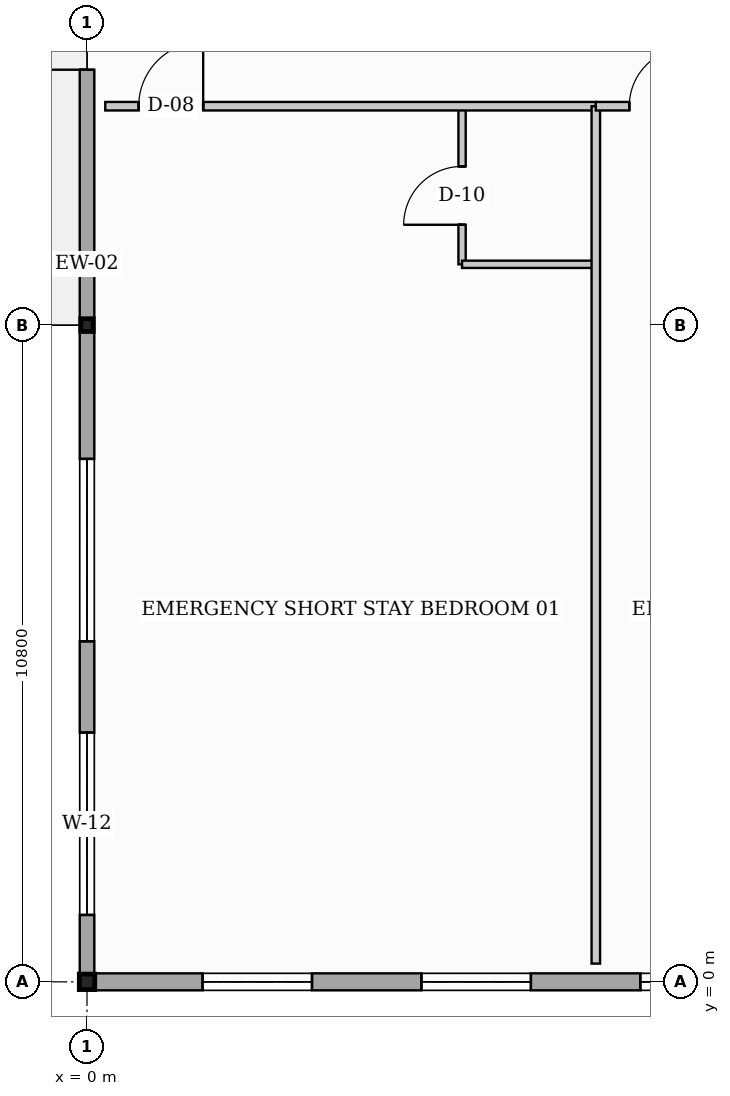
"""IFC4 building model, lengths in metres.
Left out: names, types, materials, properties, quantities, classifications, styles, units other than length and angle.
Written with IfcOpenShell. Run it as: python <this file> out.ifc"""

import sys

from ifc_helpers import new_model, si_unit, direction, frame, frame_2d, origin, origin_with_axes, origin_2d, place, context, subcontext, project, spatial, rectangle, i_section, extrude, element, fill, save


model = new_model("IFC4")
c1 = context("Model", 3, precision=1e-05, world=origin(), true_north=direction((0.0, 1.0)))
c2 = subcontext(c1, "Body", "Model", "MODEL_VIEW")
j1 = project(units=[si_unit("LENGTHUNIT", "METRE"), si_unit("PLANEANGLEUNIT", "RADIAN")], contexts=[c1])
p1 = place(None, origin())
s1 = spatial("IfcSite", under=j1, at=p1, CompositionType="ELEMENT")
p2 = place(p1, origin())
s2 = spatial("IfcBuilding", under=s1, at=p2, CompositionType="ELEMENT")
p3 = place(p2, origin())
s3 = spatial("IfcBuildingStorey", under=s2, at=p3, CompositionType="ELEMENT", Elevation=0.0)
p4 = place(p3, origin_with_axes())
e1 = element("IfcColumn", 1, at=p4, inside=s3, PredefinedType="COLUMN", context=c2, shape_type="SweptSolid", body=[
    extrude(i_section(OverallWidth=0.254, OverallDepth=0.254, WebThickness=0.009, FlangeThickness=0.014, at=origin_2d()), origin(), (0.0, 0.0, 1.0), 4.8),
])
p5 = place(p3, frame((0.0, 10.8, 0.0), z_axis=(0.0, 0.0, 1.0), x_axis=(1.0, 0.0, 0.0)))
e2 = element("IfcColumn", 2, at=p5, inside=s3, PredefinedType="COLUMN", context=c2, shape_type="SweptSolid", body=[
    extrude(i_section(OverallWidth=0.205, OverallDepth=0.21, WebThickness=0.009, FlangeThickness=0.014, at=origin_2d()), origin(), (0.0, 0.0, 1.0), 4.8),
])
p6 = place(p3, frame((0.0, 0.0, 0.0), z_axis=(0.0, 0.0, 1.0), x_axis=(0.0, 1.0, 0.0)))
e3 = element("IfcWall", 3, at=p6, inside=s3, PredefinedType="STANDARD", context=c2, shape_type="SweptSolid", body=[
    extrude(rectangle(XDim=45.6, YDim=0.24, at=frame_2d((22.8, 0.0))), origin(), (0.0, 0.0, 1.0), 3.738),
])
p7 = place(p6, frame((15.0, 0.0, 0.0)))
e4 = element("IfcOpeningElement", 4, at=p7, cuts=e3, PredefinedType="OPENING", context=c2, shape_type="SweptSolid", body=[
    extrude(rectangle(XDim=2.3, YDim=2.3, at=frame_2d((1.15, 1.15))), frame((0.0, 0.13, 0.0), z_axis=(0.0, -1.0, 0.0), x_axis=(1.0, 0.0, 0.0)), (0.0, 0.0, 1.0), 0.26),
])
p8 = place(p6, frame((1.1, 0.0, 0.95)))
e5 = element("IfcOpeningElement", 5, at=p8, cuts=e3, PredefinedType="OPENING", context=c2, shape_type="SweptSolid", body=[
    extrude(rectangle(XDim=3.0, YDim=1.8, at=frame_2d((1.5, 0.9))), frame((0.0, 0.13, 0.0), z_axis=(0.0, -1.0, 0.0), x_axis=(1.0, 0.0, 0.0)), (0.0, 0.0, 1.0), 0.26),
])
p9 = place(p6, frame((5.6, 0.0, 0.95)))
e6 = element("IfcOpeningElement", 6, at=p9, cuts=e3, PredefinedType="OPENING", context=c2, shape_type="SweptSolid", body=[
    extrude(rectangle(XDim=3.0, YDim=1.8, at=frame_2d((1.5, 0.9))), frame((0.0, 0.13, 0.0), z_axis=(0.0, -1.0, 0.0), x_axis=(1.0, 0.0, 0.0)), (0.0, 0.0, 1.0), 0.26),
])
p10 = place(p6, frame((23.6, 0.0, 0.95)))
e7 = element("IfcOpeningElement", 7, at=p10, cuts=e3, PredefinedType="OPENING", context=c2, shape_type="SweptSolid", body=[
    extrude(rectangle(XDim=3.0, YDim=1.8, at=frame_2d((1.5, 0.9))), frame((0.0, 0.13, 0.0), z_axis=(0.0, -1.0, 0.0), x_axis=(1.0, 0.0, 0.0)), (0.0, 0.0, 1.0), 0.26),
])
p11 = place(p6, frame((28.1, 0.0, 0.95)))
e8 = element("IfcOpeningElement", 8, at=p11, cuts=e3, PredefinedType="OPENING", context=c2, shape_type="SweptSolid", body=[
    extrude(rectangle(XDim=3.0, YDim=1.8, at=frame_2d((1.5, 0.9))), frame((0.0, 0.13, 0.0), z_axis=(0.0, -1.0, 0.0), x_axis=(1.0, 0.0, 0.0)), (0.0, 0.0, 1.0), 0.26),
])
p12 = place(p6, frame((37.1, 0.0, 0.95)))
e9 = element("IfcOpeningElement", 9, at=p12, cuts=e3, PredefinedType="OPENING", context=c2, shape_type="SweptSolid", body=[
    extrude(rectangle(XDim=3.0, YDim=1.8, at=frame_2d((1.5, 0.9))), frame((0.0, 0.13, 0.0), z_axis=(0.0, -1.0, 0.0), x_axis=(1.0, 0.0, 0.0)), (0.0, 0.0, 1.0), 0.26),
])
p13 = place(p6, frame((41.6, 0.0, 0.95)))
e10 = element("IfcOpeningElement", 10, at=p13, cuts=e3, PredefinedType="OPENING", context=c2, shape_type="SweptSolid", body=[
    extrude(rectangle(XDim=3.0, YDim=1.8, at=frame_2d((1.5, 0.9))), frame((0.0, 0.13, 0.0), z_axis=(0.0, -1.0, 0.0), x_axis=(1.0, 0.0, 0.0)), (0.0, 0.0, 1.0), 0.26),
])
p14 = place(p3, frame((48.0, 0.0, 0.0), z_axis=(0.0, 0.0, 1.0), x_axis=(-1.0, 0.0, 0.0)))
e11 = element("IfcWall", 11, at=p14, inside=s3, PredefinedType="STANDARD", context=c2, shape_type="SweptSolid", body=[
    extrude(rectangle(XDim=48.0, YDim=0.28, at=frame_2d((24.0, 0.0))), origin(), (0.0, 0.0, 1.0), 3.828),
])
p15 = place(p14, frame((1.1, 0.0, 0.95)))
e12 = element("IfcOpeningElement", 12, at=p15, cuts=e11, PredefinedType="OPENING", context=c2, shape_type="SweptSolid", body=[
    extrude(rectangle(XDim=1.8, YDim=0.9, at=frame_2d((0.9, 0.45))), frame((0.0, 0.15, 0.0), z_axis=(0.0, -1.0, 0.0), x_axis=(1.0, 0.0, 0.0)), (0.0, 0.0, 1.0), 0.3),
])
p16 = place(p14, frame((4.7, 0.0, 0.95)))
e13 = element("IfcOpeningElement", 13, at=p16, cuts=e11, PredefinedType="OPENING", context=c2, shape_type="SweptSolid", body=[
    extrude(rectangle(XDim=1.8, YDim=0.9, at=frame_2d((0.9, 0.45))), frame((0.0, 0.15, 0.0), z_axis=(0.0, -1.0, 0.0), x_axis=(1.0, 0.0, 0.0)), (0.0, 0.0, 1.0), 0.3),
])
p17 = place(p14, frame((8.3, 0.0, 0.95)))
e14 = element("IfcOpeningElement", 14, at=p17, cuts=e11, PredefinedType="OPENING", context=c2, shape_type="SweptSolid", body=[
    extrude(rectangle(XDim=1.8, YDim=0.9, at=frame_2d((0.9, 0.45))), frame((0.0, 0.15, 0.0), z_axis=(0.0, -1.0, 0.0), x_axis=(1.0, 0.0, 0.0)), (0.0, 0.0, 1.0), 0.3),
])
p18 = place(p14, frame((15.5, 0.0, 0.95)))
e15 = element("IfcOpeningElement", 15, at=p18, cuts=e11, PredefinedType="OPENING", context=c2, shape_type="SweptSolid", body=[
    extrude(rectangle(XDim=1.8, YDim=0.9, at=frame_2d((0.9, 0.45))), frame((0.0, 0.15, 0.0), z_axis=(0.0, -1.0, 0.0), x_axis=(1.0, 0.0, 0.0)), (0.0, 0.0, 1.0), 0.3),
])
p19 = place(p14, frame((19.1, 0.0, 0.95)))
e16 = element("IfcOpeningElement", 16, at=p19, cuts=e11, PredefinedType="OPENING", context=c2, shape_type="SweptSolid", body=[
    extrude(rectangle(XDim=1.8, YDim=0.9, at=frame_2d((0.9, 0.45))), frame((0.0, 0.15, 0.0), z_axis=(0.0, -1.0, 0.0), x_axis=(1.0, 0.0, 0.0)), (0.0, 0.0, 1.0), 0.3),
])
p20 = place(p14, frame((26.3, 0.0, 0.95)))
e17 = element("IfcOpeningElement", 17, at=p20, cuts=e11, PredefinedType="OPENING", context=c2, shape_type="SweptSolid", body=[
    extrude(rectangle(XDim=1.8, YDim=0.9, at=frame_2d((0.9, 0.45))), frame((0.0, 0.15, 0.0), z_axis=(0.0, -1.0, 0.0), x_axis=(1.0, 0.0, 0.0)), (0.0, 0.0, 1.0), 0.3),
])
p21 = place(p14, frame((29.9, 0.0, 0.95)))
e18 = element("IfcOpeningElement", 18, at=p21, cuts=e11, PredefinedType="OPENING", context=c2, shape_type="SweptSolid", body=[
    extrude(rectangle(XDim=1.8, YDim=0.9, at=frame_2d((0.9, 0.45))), frame((0.0, 0.15, 0.0), z_axis=(0.0, -1.0, 0.0), x_axis=(1.0, 0.0, 0.0)), (0.0, 0.0, 1.0), 0.3),
])
p22 = place(p14, frame((37.1, 0.0, 0.95)))
e19 = element("IfcOpeningElement", 19, at=p22, cuts=e11, PredefinedType="OPENING", context=c2, shape_type="SweptSolid", body=[
    extrude(rectangle(XDim=1.8, YDim=0.9, at=frame_2d((0.9, 0.45))), frame((0.0, 0.15, 0.0), z_axis=(0.0, -1.0, 0.0), x_axis=(1.0, 0.0, 0.0)), (0.0, 0.0, 1.0), 0.3),
])
p23 = place(p14, frame((40.7, 0.0, 0.95)))
e20 = element("IfcOpeningElement", 20, at=p23, cuts=e11, PredefinedType="OPENING", context=c2, shape_type="SweptSolid", body=[
    extrude(rectangle(XDim=1.8, YDim=0.9, at=frame_2d((0.9, 0.45))), frame((0.0, 0.15, 0.0), z_axis=(0.0, -1.0, 0.0), x_axis=(1.0, 0.0, 0.0)), (0.0, 0.0, 1.0), 0.3),
])
p24 = place(p14, frame((44.3, 0.0, 0.95)))
e21 = element("IfcOpeningElement", 21, at=p24, cuts=e11, PredefinedType="OPENING", context=c2, shape_type="SweptSolid", body=[
    extrude(rectangle(XDim=1.8, YDim=0.9, at=frame_2d((0.9, 0.45))), frame((0.0, 0.15, 0.0), z_axis=(0.0, -1.0, 0.0), x_axis=(1.0, 0.0, 0.0)), (0.0, 0.0, 1.0), 0.3),
])
p25 = place(p3, frame((6.168, 11.8, 0.0), z_axis=(0.0, 0.0, 1.0), x_axis=(0.0, 1.0, 0.0)))
e22 = element("IfcWall", 22, at=p25, inside=s3, PredefinedType="PARTITIONING", context=c2, shape_type="SweptSolid", body=[
    extrude(rectangle(XDim=2.6, YDim=0.12, at=frame_2d((1.3, 0.0))), origin(), (0.0, 0.0, 1.0), 4.071),
])
p26 = place(p25, frame((0.65, 0.0, 0.0)))
e23 = element("IfcOpeningElement", 23, at=p26, cuts=e22, PredefinedType="OPENING", context=c2, shape_type="SweptSolid", body=[
    extrude(rectangle(XDim=0.96, YDim=2.06, at=frame_2d((0.48, 1.03))), frame((0.0, 0.07, 0.0), z_axis=(0.0, -1.0, 0.0), x_axis=(1.0, 0.0, 0.0)), (0.0, 0.0, 1.0), 0.14),
])
p27 = place(p3, frame((6.168, 11.8, 0.0), z_axis=(0.0, 0.0, 1.0), x_axis=(1.0, 0.0, 0.0)))
e24 = element("IfcWall", 24, at=p27, inside=s3, PredefinedType="PARTITIONING", context=c2, shape_type="SweptSolid", body=[
    extrude(rectangle(XDim=2.2, YDim=0.12, at=frame_2d((1.1, 0.0))), origin(), (0.0, 0.0, 1.0), 4.445),
])
p28 = place(p3, frame((0.3, 14.4, 0.0), z_axis=(0.0, 0.0, 1.0), x_axis=(1.0, 0.0, 0.0)))
e25 = element("IfcWall", 25, at=p28, inside=s3, PredefinedType="PARTITIONING", context=c2, shape_type="SweptSolid", body=[
    extrude(rectangle(XDim=8.068, YDim=0.14, at=frame_2d((4.034, 0.0))), origin(), (0.0, 0.0, 1.0), 4.027),
])
p29 = place(p28, frame((0.55, 0.0, 0.0)))
e26 = element("IfcOpeningElement", 26, at=p29, cuts=e25, PredefinedType="OPENING", context=c2, shape_type="SweptSolid", body=[
    extrude(rectangle(XDim=1.06, YDim=2.1, at=frame_2d((0.53, 1.05))), frame((0.0, 0.08, 0.0), z_axis=(0.0, -1.0, 0.0), x_axis=(1.0, 0.0, 0.0)), (0.0, 0.0, 1.0), 0.16),
])
p30 = place(p3, frame((8.368, 0.3, 0.0), z_axis=(0.0, 0.0, 1.0), x_axis=(0.0, 1.0, 0.0)))
e27 = element("IfcWall", 27, at=p30, inside=s3, PredefinedType="PARTITIONING", context=c2, shape_type="SweptSolid", body=[
    extrude(rectangle(XDim=14.1, YDim=0.14, at=frame_2d((7.05, 0.0))), origin(), (0.0, 0.0, 1.0), 3.738),
])
p31 = place(p3, frame((8.368, 14.4, 0.0), z_axis=(0.0, 0.0, 1.0), x_axis=(1.0, 0.0, 0.0)))
e28 = element("IfcWall", 28, at=p31, inside=s3, PredefinedType="PARTITIONING", context=c2, shape_type="SweptSolid", body=[
    extrude(rectangle(XDim=8.068, YDim=0.14, at=frame_2d((4.034, 0.0))), origin(), (0.0, 0.0, 1.0), 3.897),
])
p32 = place(p31, frame((0.55, 0.0, 0.0)))
e29 = element("IfcOpeningElement", 29, at=p32, cuts=e28, PredefinedType="OPENING", context=c2, shape_type="SweptSolid", body=[
    extrude(rectangle(XDim=0.96, YDim=2.06, at=frame_2d((0.48, 1.03))), frame((0.0, 0.08, 0.0), z_axis=(0.0, -1.0, 0.0), x_axis=(1.0, 0.0, 0.0)), (0.0, 0.0, 1.0), 0.16),
])
p33 = place(p7, origin())
e30 = element("IfcDoor", 30, at=p33, inside=s3, OperationType="DOUBLE_DOOR_SINGLE_SWING", PredefinedType="DOOR", context=c2, shape_type="SweptSolid", body=[
    extrude(rectangle(XDim=2.3, YDim=2.3, at=frame_2d((1.15, 1.15))), frame((0.0, 0.025, 0.0), z_axis=(0.0, -1.0, 0.0), x_axis=(1.0, 0.0, 0.0)), (0.0, 0.0, 1.0), 0.05),
])
fill(e4, e30)
p34 = place(p8, origin())
e31 = element("IfcWindow", 31, at=p34, inside=s3, PartitioningType="TRIPLE_PANEL_VERTICAL", PredefinedType="WINDOW", context=c2, shape_type="SweptSolid", body=[
    extrude(rectangle(XDim=3.0, YDim=1.8, at=frame_2d((1.5, 0.9))), frame((0.0, 0.03, 0.0), z_axis=(0.0, -1.0, 0.0), x_axis=(1.0, 0.0, 0.0)), (0.0, 0.0, 1.0), 0.06),
])
fill(e5, e31)
p35 = place(p9, origin())
e32 = element("IfcWindow", 32, at=p35, inside=s3, PartitioningType="TRIPLE_PANEL_VERTICAL", PredefinedType="WINDOW", context=c2, shape_type="SweptSolid", body=[
    extrude(rectangle(XDim=3.0, YDim=1.8, at=frame_2d((1.5, 0.9))), frame((0.0, 0.03, 0.0), z_axis=(0.0, -1.0, 0.0), x_axis=(1.0, 0.0, 0.0)), (0.0, 0.0, 1.0), 0.06),
])
fill(e6, e32)
p36 = place(p22, origin())
e33 = element("IfcWindow", 33, at=p36, inside=s3, PartitioningType="DOUBLE_PANEL_HORIZONTAL", PredefinedType="WINDOW", context=c2, shape_type="SweptSolid", body=[
    extrude(rectangle(XDim=1.8, YDim=0.9, at=frame_2d((0.9, 0.45))), frame((0.0, 0.03, 0.0), z_axis=(0.0, -1.0, 0.0), x_axis=(1.0, 0.0, 0.0)), (0.0, 0.0, 1.0), 0.06),
])
fill(e19, e33)
p37 = place(p23, origin())
e34 = element("IfcWindow", 34, at=p37, inside=s3, PartitioningType="DOUBLE_PANEL_HORIZONTAL", PredefinedType="WINDOW", context=c2, shape_type="SweptSolid", body=[
    extrude(rectangle(XDim=1.8, YDim=0.9, at=frame_2d((0.9, 0.45))), frame((0.0, 0.03, 0.0), z_axis=(0.0, -1.0, 0.0), x_axis=(1.0, 0.0, 0.0)), (0.0, 0.0, 1.0), 0.06),
])
fill(e20, e34)
p38 = place(p24, origin())
e35 = element("IfcWindow", 35, at=p38, inside=s3, PartitioningType="DOUBLE_PANEL_HORIZONTAL", PredefinedType="WINDOW", context=c2, shape_type="SweptSolid", body=[
    extrude(rectangle(XDim=1.8, YDim=0.9, at=frame_2d((0.9, 0.45))), frame((0.0, 0.03, 0.0), z_axis=(0.0, -1.0, 0.0), x_axis=(1.0, 0.0, 0.0)), (0.0, 0.0, 1.0), 0.06),
])
fill(e21, e35)
p39 = place(p26, origin())
e36 = element("IfcDoor", 36, at=p39, inside=s3, OperationType="SINGLE_SWING_LEFT", PredefinedType="DOOR", context=c2, shape_type="SweptSolid", body=[
    extrude(rectangle(XDim=0.96, YDim=2.06, at=frame_2d((0.48, 1.03))), frame((0.0, 0.025, 0.0), z_axis=(0.0, -1.0, 0.0), x_axis=(1.0, 0.0, 0.0)), (0.0, 0.0, 1.0), 0.05),
])
fill(e23, e36)
p40 = place(p29, origin())
e37 = element("IfcDoor", 37, at=p40, inside=s3, OperationType="SINGLE_SWING_RIGHT", PredefinedType="DOOR", context=c2, shape_type="SweptSolid", body=[
    extrude(rectangle(XDim=1.06, YDim=2.1, at=frame_2d((0.53, 1.05))), frame((0.0, 0.025, 0.0), z_axis=(0.0, -1.0, 0.0), x_axis=(1.0, 0.0, 0.0)), (0.0, 0.0, 1.0), 0.05),
])
fill(e26, e37)
p41 = place(p32, origin())
e38 = element("IfcDoor", 38, at=p41, inside=s3, OperationType="SINGLE_SWING_RIGHT", PredefinedType="DOOR", context=c2, shape_type="SweptSolid", body=[
    extrude(rectangle(XDim=0.96, YDim=2.06, at=frame_2d((0.48, 1.03))), frame((0.0, 0.025, 0.0), z_axis=(0.0, -1.0, 0.0), x_axis=(1.0, 0.0, 0.0)), (0.0, 0.0, 1.0), 0.05),
])
fill(e29, e38)
save(model, sys.argv[1])
